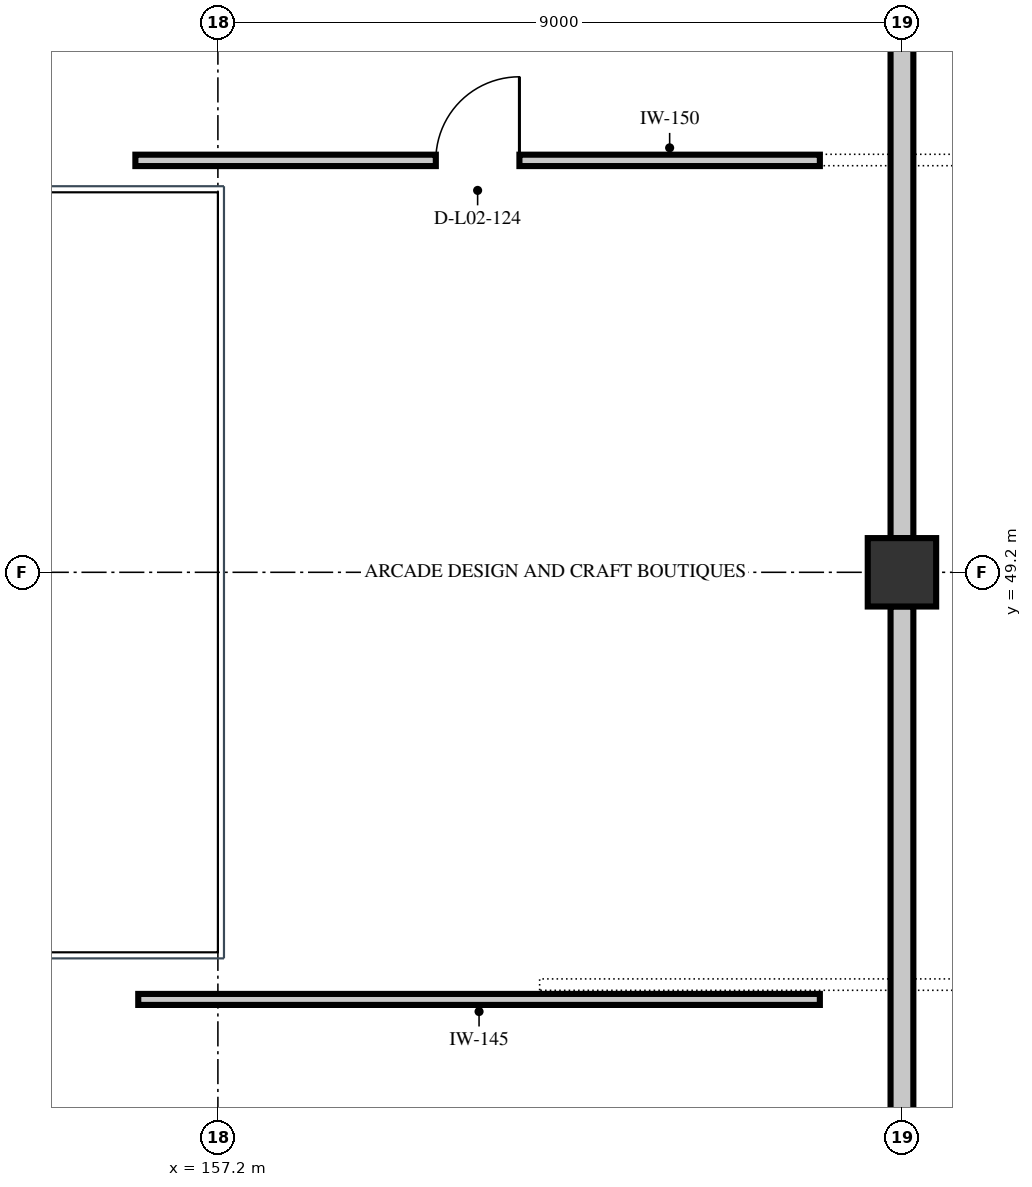
"""IFC4 building model, lengths in metres.
Left out: names, types, materials, properties, quantities, classifications, styles, units other than length and angle.
Written with IfcOpenShell. Run it as: python <this file> out.ifc"""

import sys

from ifc_helpers import new_model, si_unit, direction, frame, frame_2d, origin, origin_2d, place, context, subcontext, project, spatial, rectangle, extrude, element, fill, save


model = new_model("IFC4")
c1 = context("Model", 3, precision=1e-05, world=origin(), true_north=direction((0.0, 1.0)))
c2 = subcontext(c1, "Body", "Model", "MODEL_VIEW")
j1 = project(units=[si_unit("LENGTHUNIT", "METRE"), si_unit("PLANEANGLEUNIT", "RADIAN")], contexts=[c1])
p1 = place(None, origin())
s1 = spatial("IfcSite", under=j1, at=p1, CompositionType="ELEMENT")
p2 = place(p1, origin())
s2 = spatial("IfcBuilding", under=s1, at=p2, CompositionType="ELEMENT")
p3 = place(p2, frame((0.0, 0.0, 10.2)))
s3 = spatial("IfcBuildingStorey", under=s2, at=p3, CompositionType="ELEMENT", Elevation=10.2)
p4 = place(p3, frame((166.2, 49.2, 0.0), z_axis=(0.0, 0.0, 1.0), x_axis=(1.0, 0.0, 0.0)))
e1 = element("IfcColumn", 1, at=p4, inside=s3, PredefinedType="COLUMN", context=c2, shape_type="SweptSolid", body=[
    extrude(rectangle(XDim=0.9, YDim=0.9, at=origin_2d()), origin(), (0.0, 0.0, 1.0), 4.8),
])
p5 = place(p3, frame((166.2, 59.602, 0.0), z_axis=(0.0, 0.0, 1.0), x_axis=(0.0, -1.0, 0.0)))
e2 = element("IfcWall", 2, at=p5, inside=s3, PredefinedType="SOLIDWALL", context=c2, shape_type="SweptSolid", body=[
    extrude(rectangle(XDim=9.954, YDim=0.3, at=frame_2d((4.977, 0.0))), origin(), (0.0, 0.0, 1.0), 3.39),
])
p6 = place(p3, frame((166.2, 48.752, 0.0), z_axis=(0.0, 0.0, 1.0), x_axis=(0.0, -1.0, 0.0)))
e3 = element("IfcWall", 3, at=p6, inside=s3, PredefinedType="SOLIDWALL", context=c2, shape_type="SweptSolid", body=[
    extrude(rectangle(XDim=9.954, YDim=0.3, at=frame_2d((4.977, 0.0))), origin(), (0.0, 0.0, 1.0), 3.39),
])
p7 = place(p3, frame((156.115, 54.62, 0.0), z_axis=(0.0, 0.0, 1.0), x_axis=(1.0, 0.0, 0.0)))
e4 = element("IfcWall", 4, at=p7, inside=s3, PredefinedType="PARTITIONING", context=c2, shape_type="SweptSolid", body=[
    extrude(rectangle(XDim=9.006, YDim=0.15, at=frame_2d((4.503, 0.0))), origin(), (0.0, 0.0, 1.0), 4.515),
])
p8 = place(p7, frame((3.953, 0.0, 0.0)))
e5 = element("IfcOpeningElement", 5, at=p8, cuts=e4, PredefinedType="OPENING", context=c2, shape_type="SweptSolid", body=[
    extrude(rectangle(XDim=1.1, YDim=2.15, at=frame_2d((0.55, 1.075))), frame((0.0, 0.087, 0.0), z_axis=(0.0, -1.0, 0.0), x_axis=(1.0, 0.0, 0.0)), (0.0, 0.0, 1.0), 0.174),
])
p9 = place(p3, frame((165.12, 43.58, 0.0), z_axis=(0.0, 0.0, 1.0), x_axis=(-1.0, 0.0, 0.0)))
e6 = element("IfcWall", 6, at=p9, inside=s3, PredefinedType="PARTITIONING", context=c2, shape_type="SweptSolid", body=[
    extrude(rectangle(XDim=8.968, YDim=0.145, at=frame_2d((4.484, 0.0))), origin(), (0.0, 0.0, 1.0), 4.515),
])
p10 = place(p8, origin())
e7 = element("IfcDoor", 7, at=p10, inside=s3, OperationType="SINGLE_SWING_RIGHT", PredefinedType="DOOR", context=c2, shape_type="SweptSolid", body=[
    extrude(rectangle(XDim=1.1, YDim=2.15, at=frame_2d((0.55, 1.075))), frame((0.0, 0.025, 0.0), z_axis=(0.0, -1.0, 0.0), x_axis=(1.0, 0.0, 0.0)), (0.0, 0.0, 1.0), 0.05),
])
fill(e5, e7)
save(model, sys.argv[1])
